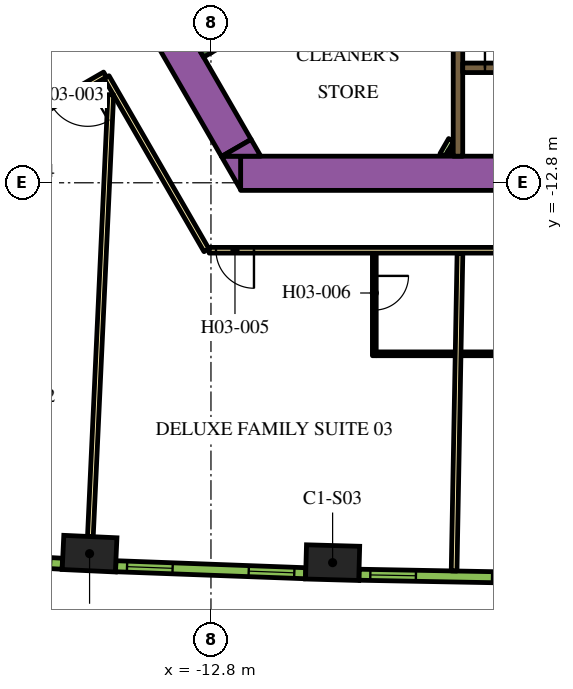
"""IFC4 building model, lengths in metres.
Left out: names, types, materials, properties, quantities, classifications, styles, units other than length and angle.
Written with IfcOpenShell. Run it as: python <this file> out.ifc"""

import sys

from ifc_helpers import new_model, si_unit, direction, frame, frame_2d, origin, origin_2d, place, context, subcontext, project, spatial, polyline, rectangle, outline, extrude, element, fill, save


model = new_model("IFC4")
c1 = context("Model", 3, precision=1e-05, world=origin(), true_north=direction((0.0, 1.0)))
c2 = subcontext(c1, "Body", "Model", "MODEL_VIEW")
j1 = project(units=[si_unit("LENGTHUNIT", "METRE"), si_unit("PLANEANGLEUNIT", "RADIAN")], contexts=[c1])
p1 = place(None, origin())
s1 = spatial("IfcSite", under=j1, at=p1, CompositionType="ELEMENT")
p2 = place(p1, origin())
s2 = spatial("IfcBuilding", under=s1, at=p2, CompositionType="ELEMENT")
p3 = place(p2, frame((0.0, 0.0, 58.8)))
s3 = spatial("IfcBuildingStorey", under=s2, at=p3, CompositionType="ELEMENT", Elevation=58.8)
for number, where, z_axis, x_axis in (
    (1, (-15.994, -22.558, 0.0), (0.0, 0.0, 1.0), (0.999, -0.046, 0.0)),
    (2, (-9.599, -22.795, 0.0), (0.0, 0.0, 1.0), (1.0, -0.028, 0.0)),
):
    element("IfcColumn", number, at=place(p3, frame(where, z_axis=z_axis, x_axis=x_axis)), inside=s3, PredefinedType="COLUMN", context=c2, shape_type="SweptSolid", body=[
        extrude(rectangle(XDim=1.4, YDim=0.9, at=origin_2d()), origin(), (0.0, 0.0, 1.0), 3.9),
    ])
p4 = place(p3, frame((-12.019, -12.55, 0.0), z_axis=(0.0, 0.0, 1.0), x_axis=(1.0, 0.0, 0.0)))
e3 = element("IfcWall", 3, at=p4, inside=s3, PredefinedType="SOLIDWALL", context=c2, shape_type="SweptSolid", body=[
    extrude(rectangle(XDim=21.63, YDim=0.9, at=frame_2d((10.815, 0.0))), origin(), (0.0, 0.0, 1.0), 3.9),
])
p5 = place(p3, origin())
e4 = element("IfcWall", 4, at=p5, inside=s3, PredefinedType="SOLIDWALL", context=c2, shape_type="SweptSolid", body=[
    extrude(outline(polyline([(-12.529, -12.1), (-12.021, -12.1), (-12.021, -12.98), (-12.529, -12.1)])), origin(), (0.0, 0.0, 1.0), 3.9),
])
p6 = place(p3, frame((-12.134, -11.883, 0.0), z_axis=(0.0, 0.0, 1.0), x_axis=(-0.500005339912, 0.866022320763, 0.0)))
e5 = element("IfcWall", 5, at=p6, inside=s3, PredefinedType="SOLIDWALL", context=c2, shape_type="SweptSolid", body=[
    extrude(rectangle(XDim=9.488, YDim=0.9, at=frame_2d((4.744, 0.0))), origin(), (0.0, 0.0, 1.0), 3.9),
])
e6 = element("IfcWall", 6, at=p5, inside=s3, PredefinedType="SOLIDWALL", context=c2, shape_type="SweptSolid", body=[
    extrude(outline(polyline([(-11.489, -12.1), (-12.505, -12.1), (-11.743, -11.66), (-11.489, -12.1)])), origin(), (0.0, 0.0, 1.0), 3.9),
])
p7 = place(p3, frame((-12.885, -9.431, 0.0), z_axis=(0.0, 0.0, 1.0), x_axis=(-0.500020560727, 0.866013532718, 0.0)))
e7 = element("IfcWall", 7, at=p7, inside=s3, PredefinedType="SOLIDWALL", context=c2, shape_type="SweptSolid", body=[
    extrude(rectangle(XDim=3.45, YDim=0.25, at=frame_2d((1.725, 0.0))), origin(), (0.0, 0.0, 1.0), 3.9),
])
p8 = place(p3, frame((-12.84, -9.261, 0.0), z_axis=(0.0, 0.0, 1.0), x_axis=(0.866016039709, 0.500016218704, 0.0)))
e8 = element("IfcWall", 8, at=p8, inside=s3, PredefinedType="SOLIDWALL", context=c2, shape_type="SweptSolid", body=[
    extrude(rectangle(XDim=7.05, YDim=0.25, at=frame_2d((3.525, 0.0))), origin(), (0.0, 0.0, 1.0), 3.9),
])
p9 = place(p3, frame((-6.3, -12.1, 0.0), z_axis=(0.0, 0.0, 1.0), x_axis=(0.0, 1.0, 0.0)))
e9 = element("IfcWall", 9, at=p9, inside=s3, PredefinedType="SOLIDWALL", context=c2, shape_type="SweptSolid", body=[
    extrude(rectangle(XDim=3.146, YDim=0.25, at=frame_2d((1.573, 0.0))), origin(), (0.0, 0.0, 1.0), 3.9),
])
p10 = place(p3, frame((-6.708, -12.068, 0.0), z_axis=(0.0, 0.0, 1.0), x_axis=(0.500000789788, 0.8660249478, 0.0)))
e10 = element("IfcWall", 10, at=p10, inside=s3, PredefinedType="PARTITIONING", context=c2, shape_type="SweptSolid", body=[
    extrude(rectangle(XDim=0.456, YDim=0.15, at=frame_2d((0.228, 0.0))), origin(), (0.0, 0.0, 1.0), 2.75),
])
p11 = place(p3, frame((-6.534, -12.068, 0.0), z_axis=(0.0, 0.0, 1.0), x_axis=(0.500240224089, 0.865886665912, 0.0)))
e11 = element("IfcWall", 11, at=p11, inside=s3, PredefinedType="PARTITIONING", context=c2, shape_type="SweptSolid", body=[
    extrude(rectangle(XDim=0.109, YDim=0.15, at=frame_2d((0.054, 0.0))), origin(), (0.0, 0.0, 1.0), 2.75),
])
p12 = place(p3, frame((-6.175, -9.775, 0.0), z_axis=(0.0, 0.0, 1.0), x_axis=(1.0, 0.0, 0.0)))
e12 = element("IfcWall", 12, at=p12, inside=s3, PredefinedType="SOLIDWALL", context=c2, shape_type="SweptSolid", body=[
    extrude(rectangle(XDim=12.35, YDim=0.25, at=frame_2d((6.175, 0.0))), origin(), (0.0, 0.0, 1.0), 3.9),
])
p13 = place(p12, frame((0.585, 0.0, 0.0)))
e13 = element("IfcOpeningElement", 13, at=p13, cuts=e12, PredefinedType="OPENING", context=c2, shape_type="SweptSolid", body=[
    extrude(rectangle(XDim=1.1, YDim=2.1, at=frame_2d((0.55, 1.05))), frame((0.0, 0.135, 0.0), z_axis=(0.0, -1.0, 0.0), x_axis=(1.0, 0.0, 0.0)), (0.0, 0.0, 1.0), 0.27),
])
p14 = place(p12, frame((3.105, 0.0, 0.0)))
e14 = element("IfcOpeningElement", 14, at=p14, cuts=e12, PredefinedType="OPENING", context=c2, shape_type="SweptSolid", body=[
    extrude(rectangle(XDim=1.1, YDim=2.1, at=frame_2d((0.55, 1.05))), frame((0.0, 0.135, 0.0), z_axis=(0.0, -1.0, 0.0), x_axis=(1.0, 0.0, 0.0)), (0.0, 0.0, 1.0), 0.27),
])
p15 = place(p12, frame((5.625, 0.0, 0.0)))
e15 = element("IfcOpeningElement", 15, at=p15, cuts=e12, PredefinedType="OPENING", context=c2, shape_type="SweptSolid", body=[
    extrude(rectangle(XDim=1.1, YDim=2.1, at=frame_2d((0.55, 1.05))), frame((0.0, 0.135, 0.0), z_axis=(0.0, -1.0, 0.0), x_axis=(1.0, 0.0, 0.0)), (0.0, 0.0, 1.0), 0.27),
])
p16 = place(p12, frame((8.145, 0.0, 0.0)))
e16 = element("IfcOpeningElement", 16, at=p16, cuts=e12, PredefinedType="OPENING", context=c2, shape_type="SweptSolid", body=[
    extrude(rectangle(XDim=1.1, YDim=2.1, at=frame_2d((0.55, 1.05))), frame((0.0, 0.135, 0.0), z_axis=(0.0, -1.0, 0.0), x_axis=(1.0, 0.0, 0.0)), (0.0, 0.0, 1.0), 0.27),
])
p17 = place(p12, frame((10.665, 0.0, 0.0)))
e17 = element("IfcOpeningElement", 17, at=p17, cuts=e12, PredefinedType="OPENING", context=c2, shape_type="SweptSolid", body=[
    extrude(rectangle(XDim=1.1, YDim=2.1, at=frame_2d((0.55, 1.05))), frame((0.0, 0.135, 0.0), z_axis=(0.0, -1.0, 0.0), x_axis=(1.0, 0.0, 0.0)), (0.0, 0.0, 1.0), 0.27),
])
p18 = place(p3, frame((-30.463, -16.635, 0.0), z_axis=(0.0, 0.0, 1.0), x_axis=(0.866022394896, 0.500005211512, 0.0)))
e18 = element("IfcWall", 18, at=p18, inside=s3, PredefinedType="PARTITIONING", context=c2, shape_type="SweptSolid", body=[
    extrude(rectangle(XDim=16.144, YDim=0.15, at=frame_2d((8.072, 0.0))), origin(), (0.0, 0.0, 1.0), 2.75),
])
p19 = place(p18, frame((11.004, 0.0, 0.0)))
e19 = element("IfcOpeningElement", 19, at=p19, cuts=e18, PredefinedType="OPENING", context=c2, shape_type="SweptSolid", body=[
    extrude(rectangle(XDim=1.0, YDim=2.1, at=frame_2d((0.5, 1.05))), frame((0.0, 0.085, 0.0), z_axis=(0.0, -1.0, 0.0), x_axis=(1.0, 0.0, 0.0)), (0.0, 0.0, 1.0), 0.17),
])
p20 = place(p18, frame((7.274, 0.0, 0.0)))
e20 = element("IfcOpeningElement", 20, at=p20, cuts=e18, PredefinedType="OPENING", context=c2, shape_type="SweptSolid", body=[
    extrude(rectangle(XDim=1.0, YDim=2.1, at=frame_2d((0.5, 1.05))), frame((0.0, 0.085, 0.0), z_axis=(0.0, -1.0, 0.0), x_axis=(1.0, 0.0, 0.0)), (0.0, 0.0, 1.0), 0.17),
])
p21 = place(p3, frame((-15.587, -9.952, 0.0), z_axis=(0.0, 0.0, 1.0), x_axis=(-0.866022197818, -0.500005552856, 0.0)))
e21 = element("IfcWall", 21, at=p21, inside=s3, PredefinedType="PARTITIONING", context=c2, shape_type="SweptSolid", body=[
    extrude(rectangle(XDim=16.224, YDim=0.15, at=frame_2d((8.112, 0.0))), origin(), (0.0, 0.0, 1.0), 2.75),
])
p22 = place(p21, frame((7.949, 0.0, 0.0)))
e22 = element("IfcOpeningElement", 22, at=p22, cuts=e21, PredefinedType="OPENING", context=c2, shape_type="SweptSolid", body=[
    extrude(rectangle(XDim=1.0, YDim=2.1, at=frame_2d((0.5, 1.05))), frame((0.0, 0.085, 0.0), z_axis=(0.0, -1.0, 0.0), x_axis=(1.0, 0.0, 0.0)), (0.0, 0.0, 1.0), 0.17),
])
p23 = place(p21, frame((0.525, 0.0, 0.0)))
e23 = element("IfcOpeningElement", 23, at=p23, cuts=e21, PredefinedType="OPENING", context=c2, shape_type="SweptSolid", body=[
    extrude(rectangle(XDim=1.1, YDim=2.1, at=frame_2d((0.55, 1.05))), frame((0.0, 0.085, 0.0), z_axis=(0.0, -1.0, 0.0), x_axis=(1.0, 0.0, 0.0)), (0.0, 0.0, 1.0), 0.17),
])
p24 = place(p3, frame((-12.918, -14.575, 0.0), z_axis=(0.0, 0.0, 1.0), x_axis=(-0.500009150678, 0.866020120573, 0.0)))
e24 = element("IfcWall", 24, at=p24, inside=s3, PredefinedType="PARTITIONING", context=c2, shape_type="SweptSolid", body=[
    extrude(rectangle(XDim=5.258, YDim=0.15, at=frame_2d((2.629, 0.0))), origin(), (0.0, 0.0, 1.0), 2.75),
])
p25 = place(p3, frame((12.918, -14.575, 0.0), z_axis=(0.0, 0.0, 1.0), x_axis=(-1.0, 0.0, 0.0)))
e25 = element("IfcWall", 25, at=p25, inside=s3, PredefinedType="PARTITIONING", context=c2, shape_type="SweptSolid", body=[
    extrude(rectangle(XDim=25.766, YDim=0.15, at=frame_2d((12.883, 0.0))), origin(), (0.0, 0.0, 1.0), 2.75),
])
p26 = place(p25, frame((24.586, 0.0, 0.0)))
e26 = element("IfcOpeningElement", 26, at=p26, cuts=e25, PredefinedType="OPENING", context=c2, shape_type="SweptSolid", body=[
    extrude(rectangle(XDim=1.0, YDim=2.1, at=frame_2d((0.5, 1.05))), frame((0.0, 0.085, 0.0), z_axis=(0.0, -1.0, 0.0), x_axis=(1.0, 0.0, 0.0)), (0.0, 0.0, 1.0), 0.17),
])
p27 = place(p25, frame((9.948, 0.0, 0.0)))
e27 = element("IfcOpeningElement", 27, at=p27, cuts=e25, PredefinedType="OPENING", context=c2, shape_type="SweptSolid", body=[
    extrude(rectangle(XDim=1.0, YDim=2.1, at=frame_2d((0.5, 1.05))), frame((0.0, 0.085, 0.0), z_axis=(0.0, -1.0, 0.0), x_axis=(1.0, 0.0, 0.0)), (0.0, 0.0, 1.0), 0.17),
])
p28 = place(p25, frame((8.642, 0.0, 0.0)))
e28 = element("IfcOpeningElement", 28, at=p28, cuts=e25, PredefinedType="OPENING", context=c2, shape_type="SweptSolid", body=[
    extrude(rectangle(XDim=1.0, YDim=2.1, at=frame_2d((0.5, 1.05))), frame((0.0, 0.085, 0.0), z_axis=(0.0, -1.0, 0.0), x_axis=(1.0, 0.0, 0.0)), (0.0, 0.0, 1.0), 0.17),
])
p29 = place(p25, frame((0.18, 0.0, 0.0)))
e29 = element("IfcOpeningElement", 29, at=p29, cuts=e25, PredefinedType="OPENING", context=c2, shape_type="SweptSolid", body=[
    extrude(rectangle(XDim=1.0, YDim=2.1, at=frame_2d((0.5, 1.05))), frame((0.0, 0.085, 0.0), z_axis=(0.0, -1.0, 0.0), x_axis=(1.0, 0.0, 0.0)), (0.0, 0.0, 1.0), 0.17),
])
p30 = place(p3, frame((-15.973, -22.109, 0.0), z_axis=(0.0, 0.0, 1.0), x_axis=(0.046191717129, 0.998932592955, 0.0)))
e30 = element("IfcWall", 30, at=p30, inside=s3, PredefinedType="PARTITIONING", context=c2, shape_type="SweptSolid", body=[
    extrude(rectangle(XDim=11.638, YDim=0.15, at=frame_2d((5.819, 0.0))), origin(), (0.0, 0.0, 1.0), 2.75),
])
p31 = place(p3, frame((-6.402, -23.014, 0.0), z_axis=(0.0, 0.0, 1.0), x_axis=(0.01849587109, 0.999828936745, 0.0)))
e31 = element("IfcWall", 31, at=p31, inside=s3, PredefinedType="PARTITIONING", context=c2, shape_type="SweptSolid", body=[
    extrude(rectangle(XDim=8.355, YDim=0.15, at=frame_2d((4.178, 0.0))), origin(), (0.0, 0.0, 1.0), 2.75),
])
p32 = place(p3, frame((-8.502, -14.65, 0.0), z_axis=(0.0, 0.0, 1.0), x_axis=(0.0, -1.0, 0.0)))
e32 = element("IfcWall", 32, at=p32, inside=s3, PredefinedType="PARTITIONING", context=c2, shape_type="SweptSolid", body=[
    extrude(rectangle(XDim=2.7, YDim=0.1, at=frame_2d((1.35, 0.0))), origin(), (0.0, 0.0, 1.0), 2.75),
])
p33 = place(p32, frame((0.6, 0.0, 0.0)))
e33 = element("IfcOpeningElement", 33, at=p33, cuts=e32, PredefinedType="OPENING", context=c2, shape_type="SweptSolid", body=[
    extrude(rectangle(XDim=0.9, YDim=2.1, at=frame_2d((0.45, 1.05))), frame((0.0, 0.06, 0.0), z_axis=(0.0, -1.0, 0.0), x_axis=(1.0, 0.0, 0.0)), (0.0, 0.0, 1.0), 0.12),
])
p34 = place(p3, frame((-8.452, -17.3, 0.0), z_axis=(0.0, 0.0, 1.0), x_axis=(1.0, 0.0, 0.0)))
e34 = element("IfcWall", 34, at=p34, inside=s3, PredefinedType="PARTITIONING", context=c2, shape_type="SweptSolid", body=[
    extrude(rectangle(XDim=2.07, YDim=0.1, at=frame_2d((1.035, 0.0))), origin(), (0.0, 0.0, 1.0), 2.75),
])
p35 = place(p3, frame((-4.044, -17.3, 0.0), z_axis=(0.0, 0.0, 1.0), x_axis=(-1.0, 0.0, 0.0)))
e35 = element("IfcWall", 35, at=p35, inside=s3, PredefinedType="PARTITIONING", context=c2, shape_type="SweptSolid", body=[
    extrude(rectangle(XDim=2.17, YDim=0.1, at=frame_2d((1.085, 0.0))), origin(), (0.0, 0.0, 1.0), 2.75),
])
p36 = place(p3, frame((-21.701, -22.547, 0.0), z_axis=(0.0, 0.0, 1.0), x_axis=(0.998464708705, -0.055391564976, 0.0)))
e36 = element("IfcWall", 36, at=p36, inside=s3, PredefinedType="SOLIDWALL", context=c2, shape_type="SweptSolid", body=[
    extrude(rectangle(XDim=4.998, YDim=0.29, at=frame_2d((2.499, 0.0))), origin(), (0.0, 0.0, 1.0), 3.65),
])
p37 = place(p36, frame((0.297, 0.0, 0.9)))
e37 = element("IfcOpeningElement", 37, at=p37, cuts=e36, PredefinedType="OPENING", context=c2, shape_type="SweptSolid", body=[
    extrude(rectangle(XDim=1.2, YDim=2.15, at=frame_2d((0.6, 1.075))), frame((0.0, 0.155, 0.0), z_axis=(0.0, -1.0, 0.0), x_axis=(1.0, 0.0, 0.0)), (0.0, 0.0, 1.0), 0.31),
])
p38 = place(p36, frame((3.501, 0.0, 0.9)))
e38 = element("IfcOpeningElement", 38, at=p38, cuts=e36, PredefinedType="OPENING", context=c2, shape_type="SweptSolid", body=[
    extrude(rectangle(XDim=1.2, YDim=2.15, at=frame_2d((0.6, 1.075))), frame((0.0, 0.155, 0.0), z_axis=(0.0, -1.0, 0.0), x_axis=(1.0, 0.0, 0.0)), (0.0, 0.0, 1.0), 0.31),
])
p39 = place(p3, frame((-15.305, -22.889, 0.0), z_axis=(0.0, 0.0, 1.0), x_axis=(0.999317974969, -0.036926750529, 0.0)))
e39 = element("IfcWall", 39, at=p39, inside=s3, PredefinedType="SOLIDWALL", context=c2, shape_type="SweptSolid", body=[
    extrude(rectangle(XDim=4.998, YDim=0.29, at=frame_2d((2.499, 0.0))), origin(), (0.0, 0.0, 1.0), 3.65),
])
p40 = place(p39, frame((0.297, 0.0, 0.9)))
e40 = element("IfcOpeningElement", 40, at=p40, cuts=e39, PredefinedType="OPENING", context=c2, shape_type="SweptSolid", body=[
    extrude(rectangle(XDim=1.2, YDim=2.15, at=frame_2d((0.6, 1.075))), frame((0.0, 0.155, 0.0), z_axis=(0.0, -1.0, 0.0), x_axis=(1.0, 0.0, 0.0)), (0.0, 0.0, 1.0), 0.31),
])
p41 = place(p39, frame((3.501, 0.0, 0.9)))
e41 = element("IfcOpeningElement", 41, at=p41, cuts=e39, PredefinedType="OPENING", context=c2, shape_type="SweptSolid", body=[
    extrude(rectangle(XDim=1.2, YDim=2.15, at=frame_2d((0.6, 1.075))), frame((0.0, 0.155, 0.0), z_axis=(0.0, -1.0, 0.0), x_axis=(1.0, 0.0, 0.0)), (0.0, 0.0, 1.0), 0.31),
])
p42 = place(p3, frame((-8.904, -23.113, 0.0), z_axis=(0.0, 0.0, 1.0), x_axis=(0.999829529479, -0.018463801951, 0.0)))
e42 = element("IfcWall", 42, at=p42, inside=s3, PredefinedType="SOLIDWALL", context=c2, shape_type="SweptSolid", body=[
    extrude(rectangle(XDim=4.998, YDim=0.29, at=frame_2d((2.499, 0.0))), origin(), (0.0, 0.0, 1.0), 3.65),
])
p43 = place(p42, frame((0.297, 0.0, 0.9)))
e43 = element("IfcOpeningElement", 43, at=p43, cuts=e42, PredefinedType="OPENING", context=c2, shape_type="SweptSolid", body=[
    extrude(rectangle(XDim=1.2, YDim=2.15, at=frame_2d((0.6, 1.075))), frame((0.0, 0.155, 0.0), z_axis=(0.0, -1.0, 0.0), x_axis=(1.0, 0.0, 0.0)), (0.0, 0.0, 1.0), 0.31),
])
p44 = place(p42, frame((3.501, 0.0, 0.9)))
e44 = element("IfcOpeningElement", 44, at=p44, cuts=e42, PredefinedType="OPENING", context=c2, shape_type="SweptSolid", body=[
    extrude(rectangle(XDim=1.2, YDim=2.15, at=frame_2d((0.6, 1.075))), frame((0.0, 0.155, 0.0), z_axis=(0.0, -1.0, 0.0), x_axis=(1.0, 0.0, 0.0)), (0.0, 0.0, 1.0), 0.31),
])
p45 = place(p13, origin())
e45 = element("IfcDoor", 45, at=p45, inside=s3, OperationType="DOUBLE_DOOR_SLIDING", PredefinedType="DOOR", context=c2, shape_type="SweptSolid", body=[
    extrude(rectangle(XDim=1.1, YDim=2.1, at=frame_2d((0.55, 1.05))), frame((0.0, 0.025, 0.0), z_axis=(0.0, -1.0, 0.0), x_axis=(1.0, 0.0, 0.0)), (0.0, 0.0, 1.0), 0.05),
])
fill(e13, e45)
p46 = place(p23, origin())
e46 = element("IfcDoor", 46, at=p46, inside=s3, OperationType="SINGLE_SWING_LEFT", PredefinedType="DOOR", context=c2, shape_type="SweptSolid", body=[
    extrude(rectangle(XDim=1.1, YDim=2.1, at=frame_2d((0.55, 1.05))), frame((0.0, 0.025, 0.0), z_axis=(0.0, -1.0, 0.0), x_axis=(1.0, 0.0, 0.0)), (0.0, 0.0, 1.0), 0.05),
])
fill(e23, e46)
p47 = place(p26, origin())
e47 = element("IfcDoor", 47, at=p47, inside=s3, OperationType="SINGLE_SWING_RIGHT", PredefinedType="DOOR", context=c2, shape_type="SweptSolid", body=[
    extrude(rectangle(XDim=1.0, YDim=2.1, at=frame_2d((0.5, 1.05))), frame((0.0, 0.025, 0.0), z_axis=(0.0, -1.0, 0.0), x_axis=(1.0, 0.0, 0.0)), (0.0, 0.0, 1.0), 0.05),
])
fill(e26, e47)
p48 = place(p33, origin())
e48 = element("IfcDoor", 48, at=p48, inside=s3, OperationType="SINGLE_SWING_RIGHT", PredefinedType="DOOR", context=c2, shape_type="SweptSolid", body=[
    extrude(rectangle(XDim=0.9, YDim=2.1, at=frame_2d((0.45, 1.05))), frame((0.0, 0.025, 0.0), z_axis=(0.0, -1.0, 0.0), x_axis=(1.0, 0.0, 0.0)), (0.0, 0.0, 1.0), 0.05),
])
fill(e33, e48)
p49 = place(p40, origin())
e49 = element("IfcWindow", 49, at=p49, inside=s3, PartitioningType="DOUBLE_PANEL_VERTICAL", PredefinedType="WINDOW", context=c2, shape_type="SweptSolid", body=[
    extrude(rectangle(XDim=1.2, YDim=2.15, at=frame_2d((0.6, 1.075))), frame((0.0, 0.015, 0.0), z_axis=(0.0, -1.0, 0.0), x_axis=(1.0, 0.0, 0.0)), (0.0, 0.0, 1.0), 0.06),
])
fill(e40, e49)
p50 = place(p41, origin())
e50 = element("IfcWindow", 50, at=p50, inside=s3, PartitioningType="DOUBLE_PANEL_VERTICAL", PredefinedType="WINDOW", context=c2, shape_type="SweptSolid", body=[
    extrude(rectangle(XDim=1.2, YDim=2.15, at=frame_2d((0.6, 1.075))), frame((0.0, 0.015, 0.0), z_axis=(0.0, -1.0, 0.0), x_axis=(1.0, 0.0, 0.0)), (0.0, 0.0, 1.0), 0.06),
])
fill(e41, e50)
p51 = place(p43, origin())
e51 = element("IfcWindow", 51, at=p51, inside=s3, PartitioningType="DOUBLE_PANEL_VERTICAL", PredefinedType="WINDOW", context=c2, shape_type="SweptSolid", body=[
    extrude(rectangle(XDim=1.2, YDim=2.15, at=frame_2d((0.6, 1.075))), frame((0.0, 0.015, 0.0), z_axis=(0.0, -1.0, 0.0), x_axis=(1.0, 0.0, 0.0)), (0.0, 0.0, 1.0), 0.06),
])
fill(e43, e51)
p52 = place(p44, origin())
e52 = element("IfcWindow", 52, at=p52, inside=s3, PartitioningType="DOUBLE_PANEL_VERTICAL", PredefinedType="WINDOW", context=c2, shape_type="SweptSolid", body=[
    extrude(rectangle(XDim=1.2, YDim=2.15, at=frame_2d((0.6, 1.075))), frame((0.0, 0.015, 0.0), z_axis=(0.0, -1.0, 0.0), x_axis=(1.0, 0.0, 0.0)), (0.0, 0.0, 1.0), 0.06),
])
fill(e44, e52)
save(model, sys.argv[1])
